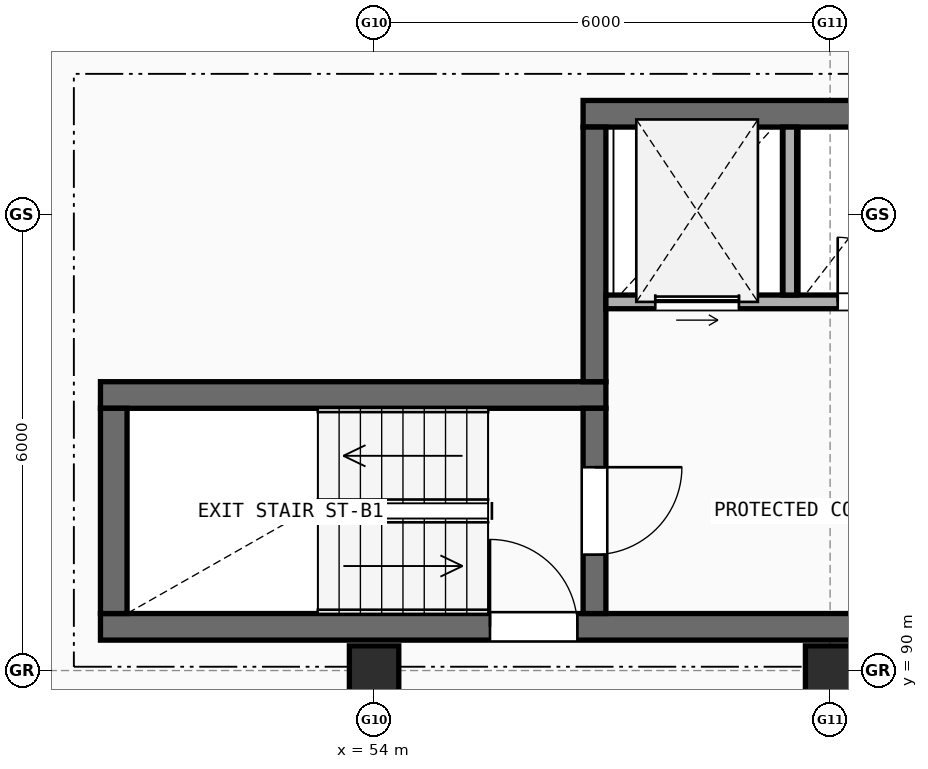
"""IFC4 building model, lengths in metres.
Left out: names, types, materials, properties, quantities, classifications, styles, units other than length and angle.
Written with IfcOpenShell. Run it as: python <this file> out.ifc"""

import sys

from ifc_helpers import new_model, si_unit, direction, frame, frame_2d, origin, origin_2d, place, context, subcontext, project, spatial, rectangle, extrude, element, fill, save


model = new_model("IFC4")
c1 = context("Model", 3, precision=1e-05, world=origin(), true_north=direction((0.0, 1.0)))
c2 = subcontext(c1, "Body", "Model", "MODEL_VIEW")
j1 = project(units=[si_unit("LENGTHUNIT", "METRE"), si_unit("PLANEANGLEUNIT", "RADIAN")], contexts=[c1])
p1 = place(None, origin())
s1 = spatial("IfcSite", under=j1, at=p1, CompositionType="ELEMENT")
p2 = place(p1, origin())
s2 = spatial("IfcBuilding", under=s1, at=p2, CompositionType="ELEMENT")
p3 = place(p2, frame((0.0, 0.0, 10.9)))
s3 = spatial("IfcBuildingStorey", under=s2, at=p3, CompositionType="ELEMENT", Elevation=10.9)
for number, where, z_axis, x_axis in (
    (1, (54.0, 90.0, 0.0), (0.0, 0.0, 1.0), (1.0, 0.0, 0.0)),
    (2, (60.0, 90.0, 0.0), (0.0, 0.0, 1.0), (1.0, 0.0, 0.0)),
):
    element("IfcColumn", number, at=place(p3, frame(where, z_axis=z_axis, x_axis=x_axis)), inside=s3, PredefinedType="COLUMN", context=c2, shape_type="SweptSolid", body=[
        extrude(rectangle(XDim=0.65, YDim=0.65, at=origin_2d()), origin(), (0.0, 0.0, 1.0), 2.96),
    ])
p4 = place(p3, frame((50.4, 90.575, 0.0), z_axis=(0.0, 0.0, 1.0), x_axis=(1.0, 0.0, 0.0)))
e3 = element("IfcWall", 3, at=p4, inside=s3, PredefinedType="SHEAR", context=c2, shape_type="SweptSolid", body=[
    extrude(rectangle(XDim=11.4, YDim=0.35, at=frame_2d((5.7, 0.0))), origin(), (0.0, 0.0, 1.0), 2.96),
])
p5 = place(p4, frame((5.125, 0.0, 0.0)))
e4 = element("IfcOpeningElement", 4, at=p5, cuts=e3, PredefinedType="OPENING", context=c2, shape_type="SweptSolid", body=[
    extrude(rectangle(XDim=1.15, YDim=2.15, at=frame_2d((0.575, 1.075))), frame((0.0, 0.185, 0.0), z_axis=(0.0, -1.0, 0.0), x_axis=(1.0, 0.0, 0.0)), (0.0, 0.0, 1.0), 0.37),
])
p6 = place(p3, frame((57.05, 93.625, 0.0), z_axis=(0.0, 0.0, 1.0), x_axis=(-1.0, 0.0, 0.0)))
e5 = element("IfcWall", 5, at=p6, inside=s3, PredefinedType="SHEAR", context=c2, shape_type="SweptSolid", body=[
    extrude(rectangle(XDim=6.65, YDim=0.35, at=frame_2d((3.325, 0.0))), origin(), (0.0, 0.0, 1.0), 2.96),
])
p7 = place(p3, frame((50.575, 93.45, 0.0), z_axis=(0.0, 0.0, 1.0), x_axis=(0.0, -1.0, 0.0)))
e6 = element("IfcWall", 6, at=p7, inside=s3, PredefinedType="SHEAR", context=c2, shape_type="SweptSolid", body=[
    extrude(rectangle(XDim=2.7, YDim=0.35, at=frame_2d((1.35, 0.0))), origin(), (0.0, 0.0, 1.0), 2.96),
])
p8 = place(p3, frame((56.9, 90.75, 0.0), z_axis=(0.0, 0.0, 1.0), x_axis=(0.0, 1.0, 0.0)))
e7 = element("IfcWall", 7, at=p8, inside=s3, PredefinedType="SHEAR", context=c2, shape_type="SweptSolid", body=[
    extrude(rectangle(XDim=2.7, YDim=0.3, at=frame_2d((1.35, 0.0))), origin(), (0.0, 0.0, 1.0), 2.96),
])
p9 = place(p8, frame((0.775, 0.0, 0.0)))
e8 = element("IfcOpeningElement", 8, at=p9, cuts=e7, PredefinedType="OPENING", context=c2, shape_type="SweptSolid", body=[
    extrude(rectangle(XDim=1.15, YDim=2.15, at=frame_2d((0.575, 1.075))), frame((0.0, 0.16, 0.0), z_axis=(0.0, -1.0, 0.0), x_axis=(1.0, 0.0, 0.0)), (0.0, 0.0, 1.0), 0.32),
])
p10 = place(p3, frame((61.8, 97.325, 0.0), z_axis=(0.0, 0.0, 1.0), x_axis=(-1.0, 0.0, 0.0)))
e9 = element("IfcWall", 9, at=p10, inside=s3, PredefinedType="SHEAR", context=c2, shape_type="SweptSolid", body=[
    extrude(rectangle(XDim=5.05, YDim=0.35, at=frame_2d((2.525, 0.0))), origin(), (0.0, 0.0, 1.0), 2.96),
])
p11 = place(p3, frame((56.9, 93.8, 0.0), z_axis=(0.0, 0.0, 1.0), x_axis=(0.0, 1.0, 0.0)))
e10 = element("IfcWall", 10, at=p11, inside=s3, PredefinedType="SHEAR", context=c2, shape_type="SweptSolid", body=[
    extrude(rectangle(XDim=3.35, YDim=0.3, at=frame_2d((1.675, 0.0))), origin(), (0.0, 0.0, 1.0), 2.96),
])
p12 = place(p3, frame((57.05, 94.85, 0.0), z_axis=(0.0, 0.0, 1.0), x_axis=(1.0, 0.0, 0.0)))
e11 = element("IfcWall", 11, at=p12, inside=s3, PredefinedType="SOLIDWALL", context=c2, shape_type="SweptSolid", body=[
    extrude(rectangle(XDim=4.4, YDim=0.18, at=frame_2d((2.2, 0.0))), origin(), (0.0, 0.0, 1.0), 2.96),
])
p13 = place(p12, frame((0.65, 0.0, 0.0)))
e12 = element("IfcOpeningElement", 12, at=p13, cuts=e11, PredefinedType="OPENING", context=c2, shape_type="SweptSolid", body=[
    extrude(rectangle(XDim=1.1, YDim=2.15, at=frame_2d((0.55, 1.075))), frame((0.0, 0.1, 0.0), z_axis=(0.0, -1.0, 0.0), x_axis=(1.0, 0.0, 0.0)), (0.0, 0.0, 1.0), 0.2),
])
p14 = place(p12, frame((3.05, 0.0, 0.0)))
e13 = element("IfcOpeningElement", 13, at=p14, cuts=e11, PredefinedType="OPENING", context=c2, shape_type="SweptSolid", body=[
    extrude(rectangle(XDim=0.85, YDim=2.1, at=frame_2d((0.425, 1.05))), frame((0.0, 0.1, 0.0), z_axis=(0.0, -1.0, 0.0), x_axis=(1.0, 0.0, 0.0)), (0.0, 0.0, 1.0), 0.2),
])
p15 = place(p3, frame((59.47, 94.94, 0.0), z_axis=(0.0, 0.0, 1.0), x_axis=(0.0, 1.0, 0.0)))
e14 = element("IfcWall", 14, at=p15, inside=s3, PredefinedType="SOLIDWALL", context=c2, shape_type="SweptSolid", body=[
    extrude(rectangle(XDim=2.21, YDim=0.18, at=frame_2d((1.105, 0.0))), origin(), (0.0, 0.0, 1.0), 2.96),
])
p16 = place(p5, origin())
e15 = element("IfcDoor", 15, at=p16, inside=s3, OperationType="SINGLE_SWING_LEFT", PredefinedType="DOOR", context=c2, shape_type="SweptSolid", body=[
    extrude(rectangle(XDim=1.15, YDim=2.15, at=frame_2d((0.575, 1.075))), frame((0.0, 0.025, 0.0), z_axis=(0.0, -1.0, 0.0), x_axis=(1.0, 0.0, 0.0)), (0.0, 0.0, 1.0), 0.05),
])
fill(e4, e15)
p17 = place(p9, origin())
e16 = element("IfcDoor", 16, at=p17, inside=s3, OperationType="SINGLE_SWING_RIGHT", PredefinedType="DOOR", context=c2, shape_type="SweptSolid", body=[
    extrude(rectangle(XDim=1.15, YDim=2.15, at=frame_2d((0.575, 1.075))), frame((0.0, 0.025, 0.0), z_axis=(0.0, -1.0, 0.0), x_axis=(1.0, 0.0, 0.0)), (0.0, 0.0, 1.0), 0.05),
])
fill(e8, e16)
p18 = place(p13, origin())
e17 = element("IfcDoor", 17, at=p18, inside=s3, OperationType="SLIDING_TO_LEFT", PredefinedType="DOOR", context=c2, shape_type="SweptSolid", body=[
    extrude(rectangle(XDim=1.1, YDim=2.15, at=frame_2d((0.55, 1.075))), frame((0.0, 0.025, 0.0), z_axis=(0.0, -1.0, 0.0), x_axis=(1.0, 0.0, 0.0)), (0.0, 0.0, 1.0), 0.05),
])
fill(e12, e17)
p19 = place(p14, frame((0.85, 0.0, 0.0), z_axis=(0.0, 0.0, 1.0), x_axis=(-1.0, 0.0, 0.0)))
e18 = element("IfcDoor", 18, at=p19, inside=s3, OperationType="SINGLE_SWING_LEFT", PredefinedType="DOOR", context=c2, shape_type="SweptSolid", body=[
    extrude(rectangle(XDim=0.85, YDim=2.1, at=frame_2d((0.425, 1.05))), frame((0.0, 0.025, 0.0), z_axis=(0.0, -1.0, 0.0), x_axis=(1.0, 0.0, 0.0)), (0.0, 0.0, 1.0), 0.05),
])
fill(e13, e18)
save(model, sys.argv[1])
